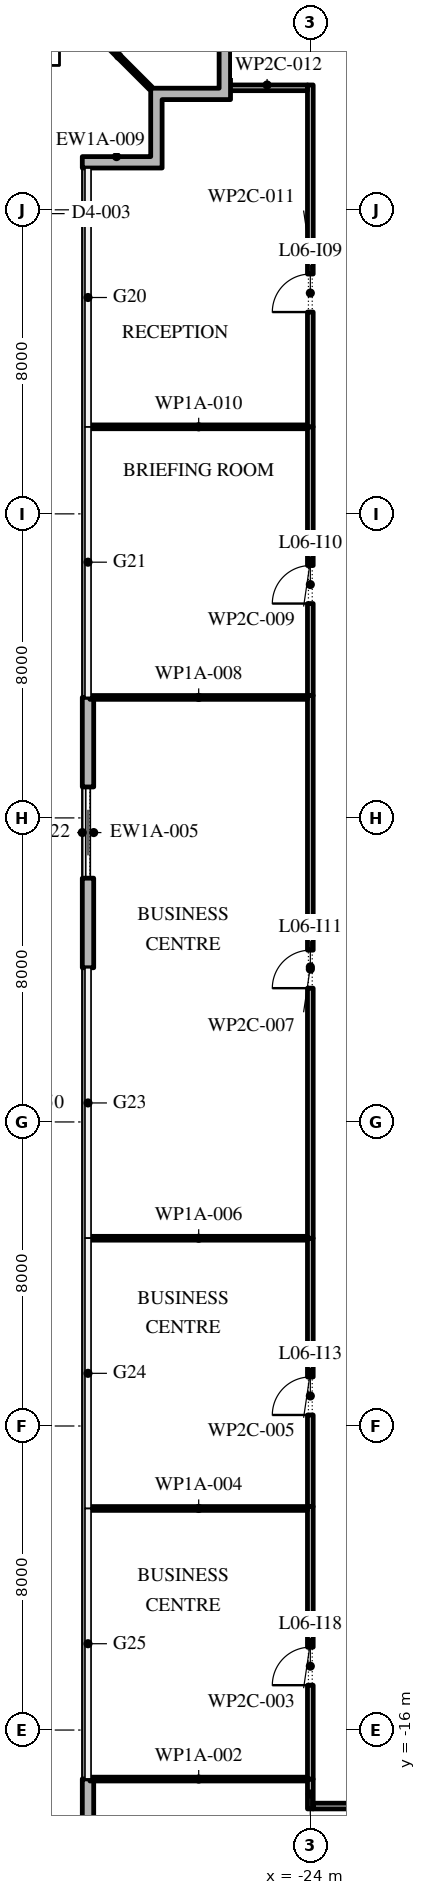
"""IFC4 building model, lengths in metres.
Left out: names, types, materials, properties, quantities, classifications, styles, units other than length and angle.
Written with IfcOpenShell. Run it as: python <this file> out.ifc"""

import sys

from ifc_helpers import new_model, si_unit, direction, frame, frame_2d, origin, place, context, subcontext, project, spatial, polyline, rectangle, outline, extrude, element, fill, save


model = new_model("IFC4")
c1 = context("Model", 3, precision=1e-05, world=origin(), true_north=direction((0.0, 1.0)))
c2 = subcontext(c1, "Body", "Model", "MODEL_VIEW")
j1 = project(units=[si_unit("LENGTHUNIT", "METRE"), si_unit("PLANEANGLEUNIT", "RADIAN")], contexts=[c1])
p1 = place(None, origin())
s1 = spatial("IfcSite", under=j1, at=p1, CompositionType="ELEMENT")
p2 = place(p1, origin())
s2 = spatial("IfcBuilding", under=s1, at=p2, CompositionType="ELEMENT")
p3 = place(p2, frame((0.0, 0.0, 33.6)))
s3 = spatial("IfcBuildingStorey", under=s2, at=p3, CompositionType="ELEMENT", Elevation=33.6)
p4 = place(p3, frame((-29.85, 11.171, 0.0), z_axis=(0.0, 0.0, 1.0), x_axis=(0.0, -1.0, 0.0)))
e1 = element("IfcWall", 1, at=p4, inside=s3, PredefinedType="STANDARD", context=c2, shape_type="SweptSolid", body=[
    extrude(rectangle(XDim=7.114, YDim=0.3, at=frame_2d((3.557, 0.0))), origin(), (0.0, 0.0, 1.0), 5.8),
])
p5 = place(p4, frame((2.357, 0.0, 0.0)))
e2 = element("IfcOpeningElement", 2, at=p5, cuts=e1, PredefinedType="OPENING", context=c2, shape_type="SweptSolid", body=[
    extrude(rectangle(XDim=2.4, YDim=3.5, at=frame_2d((1.2, 1.75))), frame((0.0, 0.16, 0.0), z_axis=(0.0, -1.0, 0.0), x_axis=(1.0, 0.0, 0.0)), (0.0, 0.0, 1.0), 0.32),
])
p6 = place(p3, frame((-29.85, -17.286, 0.0), z_axis=(0.0, 0.0, 1.0), x_axis=(0.0, -1.0, 0.0)))
e3 = element("IfcWall", 3, at=p6, inside=s3, PredefinedType="STANDARD", context=c2, shape_type="SweptSolid", body=[
    extrude(rectangle(XDim=7.114, YDim=0.3, at=frame_2d((3.557, 0.0))), origin(), (0.0, 0.0, 1.0), 5.8),
])
p7 = place(p6, frame((2.357, 0.0, 0.0)))
e4 = element("IfcOpeningElement", 4, at=p7, cuts=e3, PredefinedType="OPENING", context=c2, shape_type="SweptSolid", body=[
    extrude(rectangle(XDim=2.4, YDim=3.5, at=frame_2d((1.2, 1.75))), frame((0.0, 0.16, 0.0), z_axis=(0.0, -1.0, 0.0), x_axis=(1.0, 0.0, 0.0)), (0.0, 0.0, 1.0), 0.32),
])
p8 = place(p3, origin())
e5 = element("IfcWall", 5, at=p8, inside=s3, PredefinedType="STANDARD", context=c2, shape_type="SweptSolid", body=[
    extrude(outline(polyline([(-28.2, 25.4), (-28.2, 27.2), (-26.4, 27.2), (-26.4, 28.7), (-26.1, 28.7), (-26.1, 26.9), (-27.9, 26.9), (-27.9, 25.1), (-30.0, 25.1), (-30.0, 25.4), (-28.2, 25.4)])), origin(), (0.0, 0.0, 1.0), 5.8),
])
p9 = place(p3, frame((-28.2, 27.2, 0.0), z_axis=(0.0, 0.0, 1.0), x_axis=(-0.707106781187, 0.707106781187, 0.0)))
e6 = element("IfcWall", 6, at=p9, inside=s3, PredefinedType="STANDARD", context=c2, shape_type="SweptSolid", body=[
    extrude(rectangle(XDim=2.385, YDim=0.1, at=frame_2d((1.192, 0.0))), origin(), (0.0, 0.0, 1.0), 5.8),
])
p10 = place(p3, frame((-24.0, -18.075, 0.0), z_axis=(0.0, 0.0, 1.0), x_axis=(0.0, 1.0, 0.0)))
e7 = element("IfcWall", 7, at=p10, inside=s3, PredefinedType="PARTITIONING", context=c2, shape_type="SweptSolid", body=[
    extrude(rectangle(XDim=0.785, YDim=0.15, at=frame_2d((0.393, 0.0))), origin(), (0.0, 0.0, 1.0), 5.8),
])
p11 = place(p3, frame((-24.075, -17.29, 0.0), z_axis=(0.0, 0.0, 1.0), x_axis=(-1.0, 0.0, 0.0)))
e8 = element("IfcWall", 8, at=p11, inside=s3, PredefinedType="PARTITIONING", context=c2, shape_type="SweptSolid", body=[
    extrude(rectangle(XDim=5.725, YDim=0.1, at=frame_2d((2.863, 0.0))), origin(), (0.0, 0.0, 1.0), 5.8),
])
p12 = place(p3, frame((-24.0, -17.29, 0.0), z_axis=(0.0, 0.0, 1.0), x_axis=(0.0, 1.0, 0.0)))
e9 = element("IfcWall", 9, at=p12, inside=s3, PredefinedType="PARTITIONING", context=c2, shape_type="SweptSolid", body=[
    extrude(rectangle(XDim=7.17, YDim=0.15, at=frame_2d((3.585, 0.0))), origin(), (0.0, 0.0, 1.0), 5.8),
])
p13 = place(p12, frame((2.47, 0.0, 0.0)))
e10 = element("IfcOpeningElement", 10, at=p13, cuts=e9, PredefinedType="OPENING", context=c2, shape_type="SweptSolid", body=[
    extrude(rectangle(XDim=1.0, YDim=2.1, at=frame_2d((0.5, 1.05))), frame((0.0, 0.085, 0.0), z_axis=(0.0, -1.0, 0.0), x_axis=(1.0, 0.0, 0.0)), (0.0, 0.0, 1.0), 0.17),
])
p14 = place(p3, frame((-24.075, -10.17, 0.0), z_axis=(0.0, 0.0, 1.0), x_axis=(-1.0, 0.0, 0.0)))
e11 = element("IfcWall", 11, at=p14, inside=s3, PredefinedType="PARTITIONING", context=c2, shape_type="SweptSolid", body=[
    extrude(rectangle(XDim=5.725, YDim=0.1, at=frame_2d((2.863, 0.0))), origin(), (0.0, 0.0, 1.0), 5.8),
])
p15 = place(p3, frame((-24.0, -10.12, 0.0), z_axis=(0.0, 0.0, 1.0), x_axis=(0.0, 1.0, 0.0)))
e12 = element("IfcWall", 12, at=p15, inside=s3, PredefinedType="PARTITIONING", context=c2, shape_type="SweptSolid", body=[
    extrude(rectangle(XDim=7.06, YDim=0.15, at=frame_2d((3.53, 0.0))), origin(), (0.0, 0.0, 1.0), 5.8),
])
p16 = place(p15, frame((2.41, 0.0, 0.0)))
e13 = element("IfcOpeningElement", 13, at=p16, cuts=e12, PredefinedType="OPENING", context=c2, shape_type="SweptSolid", body=[
    extrude(rectangle(XDim=1.0, YDim=2.1, at=frame_2d((0.5, 1.05))), frame((0.0, 0.085, 0.0), z_axis=(0.0, -1.0, 0.0), x_axis=(1.0, 0.0, 0.0)), (0.0, 0.0, 1.0), 0.17),
])
p17 = place(p3, frame((-24.075, -3.06, 0.0), z_axis=(0.0, 0.0, 1.0), x_axis=(-1.0, 0.0, 0.0)))
e14 = element("IfcWall", 14, at=p17, inside=s3, PredefinedType="PARTITIONING", context=c2, shape_type="SweptSolid", body=[
    extrude(rectangle(XDim=5.725, YDim=0.1, at=frame_2d((2.863, 0.0))), origin(), (0.0, 0.0, 1.0), 5.8),
])
p18 = place(p3, frame((-24.0, -3.06, 0.0), z_axis=(0.0, 0.0, 1.0), x_axis=(0.0, 1.0, 0.0)))
e15 = element("IfcWall", 15, at=p18, inside=s3, PredefinedType="PARTITIONING", context=c2, shape_type="SweptSolid", body=[
    extrude(rectangle(XDim=14.28, YDim=0.15, at=frame_2d((7.14, 0.0))), origin(), (0.0, 0.0, 1.0), 5.8),
])
p19 = place(p18, frame((6.58, 0.0, 0.0)))
e16 = element("IfcOpeningElement", 16, at=p19, cuts=e15, PredefinedType="OPENING", context=c2, shape_type="SweptSolid", body=[
    extrude(rectangle(XDim=1.0, YDim=2.1, at=frame_2d((0.5, 1.05))), frame((0.0, 0.085, 0.0), z_axis=(0.0, -1.0, 0.0), x_axis=(1.0, 0.0, 0.0)), (0.0, 0.0, 1.0), 0.17),
])
p20 = place(p3, frame((-24.075, 11.17, 0.0), z_axis=(0.0, 0.0, 1.0), x_axis=(-1.0, 0.0, 0.0)))
e17 = element("IfcWall", 17, at=p20, inside=s3, PredefinedType="PARTITIONING", context=c2, shape_type="SweptSolid", body=[
    extrude(rectangle(XDim=5.725, YDim=0.1, at=frame_2d((2.863, 0.0))), origin(), (0.0, 0.0, 1.0), 5.8),
])
p21 = place(p3, frame((-24.0, 11.22, 0.0), z_axis=(0.0, 0.0, 1.0), x_axis=(0.0, 1.0, 0.0)))
e18 = element("IfcWall", 18, at=p21, inside=s3, PredefinedType="PARTITIONING", context=c2, shape_type="SweptSolid", body=[
    extrude(rectangle(XDim=7.07, YDim=0.15, at=frame_2d((3.535, 0.0))), origin(), (0.0, 0.0, 1.0), 5.8),
])
p22 = place(p21, frame((2.42, 0.0, 0.0)))
e19 = element("IfcOpeningElement", 19, at=p22, cuts=e18, PredefinedType="OPENING", context=c2, shape_type="SweptSolid", body=[
    extrude(rectangle(XDim=1.0, YDim=2.1, at=frame_2d((0.5, 1.05))), frame((0.0, 0.085, 0.0), z_axis=(0.0, -1.0, 0.0), x_axis=(1.0, 0.0, 0.0)), (0.0, 0.0, 1.0), 0.17),
])
p23 = place(p3, frame((-24.075, 18.29, 0.0), z_axis=(0.0, 0.0, 1.0), x_axis=(-1.0, 0.0, 0.0)))
e20 = element("IfcWall", 20, at=p23, inside=s3, PredefinedType="PARTITIONING", context=c2, shape_type="SweptSolid", body=[
    extrude(rectangle(XDim=5.725, YDim=0.1, at=frame_2d((2.863, 0.0))), origin(), (0.0, 0.0, 1.0), 5.8),
])
p24 = place(p3, frame((-24.0, 18.29, 0.0), z_axis=(0.0, 0.0, 1.0), x_axis=(0.0, 1.0, 0.0)))
e21 = element("IfcWall", 21, at=p24, inside=s3, PredefinedType="PARTITIONING", context=c2, shape_type="SweptSolid", body=[
    extrude(rectangle(XDim=8.995, YDim=0.15, at=frame_2d((4.498, 0.0))), origin(), (0.0, 0.0, 1.0), 5.8),
])
p25 = place(p24, frame((3.02, 0.0, 0.0)))
e22 = element("IfcOpeningElement", 22, at=p25, cuts=e21, PredefinedType="OPENING", context=c2, shape_type="SweptSolid", body=[
    extrude(rectangle(XDim=1.0, YDim=2.1, at=frame_2d((0.5, 1.05))), frame((0.0, 0.085, 0.0), z_axis=(0.0, -1.0, 0.0), x_axis=(1.0, 0.0, 0.0)), (0.0, 0.0, 1.0), 0.17),
])
p26 = place(p3, frame((-24.075, 27.21, 0.0), z_axis=(0.0, 0.0, 1.0), x_axis=(-1.0, 0.0, 0.0)))
e23 = element("IfcWall", 23, at=p26, inside=s3, PredefinedType="PARTITIONING", context=c2, shape_type="SweptSolid", body=[
    extrude(rectangle(XDim=2.125, YDim=0.15, at=frame_2d((1.062, 0.0))), origin(), (0.0, 0.0, 1.0), 5.8),
])
p27 = place(p3, frame((-17.65, -18.0, 0.0), z_axis=(0.0, 0.0, 1.0), x_axis=(-1.0, 0.0, 0.0)))
e24 = element("IfcWall", 24, at=p27, inside=s3, PredefinedType="PARTITIONING", context=c2, shape_type="SweptSolid", body=[
    extrude(rectangle(XDim=6.275, YDim=0.15, at=frame_2d((3.138, 0.0))), origin(), (0.0, 0.0, 1.0), 5.8),
])
p28 = place(p27, frame((2.7, 0.0, 0.0)))
e25 = element("IfcOpeningElement", 25, at=p28, cuts=e24, PredefinedType="OPENING", context=c2, shape_type="SweptSolid", body=[
    extrude(rectangle(XDim=1.0, YDim=2.1, at=frame_2d((0.5, 1.05))), frame((0.0, 0.085, 0.0), z_axis=(0.0, -1.0, 0.0), x_axis=(1.0, 0.0, 0.0)), (0.0, 0.0, 1.0), 0.17),
])
p29 = place(p5, origin())
e26 = element("IfcDoor", 26, at=p29, inside=s3, OperationType="DOUBLE_DOOR_SLIDING", PredefinedType="DOOR", context=c2, shape_type="SweptSolid", body=[
    extrude(rectangle(XDim=2.4, YDim=3.5, at=frame_2d((1.2, 1.75))), frame((0.0, 0.025, 0.0), z_axis=(0.0, -1.0, 0.0), x_axis=(1.0, 0.0, 0.0)), (0.0, 0.0, 1.0), 0.05),
])
fill(e2, e26)
p30 = place(p25, origin())
e27 = element("IfcDoor", 27, at=p30, inside=s3, OperationType="SINGLE_SWING_RIGHT", PredefinedType="DOOR", context=c2, shape_type="SweptSolid", body=[
    extrude(rectangle(XDim=1.0, YDim=2.1, at=frame_2d((0.5, 1.05))), frame((0.0, 0.025, 0.0), z_axis=(0.0, -1.0, 0.0), x_axis=(1.0, 0.0, 0.0)), (0.0, 0.0, 1.0), 0.05),
])
fill(e22, e27)
p31 = place(p22, origin())
e28 = element("IfcDoor", 28, at=p31, inside=s3, OperationType="SINGLE_SWING_RIGHT", PredefinedType="DOOR", context=c2, shape_type="SweptSolid", body=[
    extrude(rectangle(XDim=1.0, YDim=2.1, at=frame_2d((0.5, 1.05))), frame((0.0, 0.025, 0.0), z_axis=(0.0, -1.0, 0.0), x_axis=(1.0, 0.0, 0.0)), (0.0, 0.0, 1.0), 0.05),
])
fill(e19, e28)
p32 = place(p19, origin())
e29 = element("IfcDoor", 29, at=p32, inside=s3, OperationType="SINGLE_SWING_RIGHT", PredefinedType="DOOR", context=c2, shape_type="SweptSolid", body=[
    extrude(rectangle(XDim=1.0, YDim=2.1, at=frame_2d((0.5, 1.05))), frame((0.0, 0.025, 0.0), z_axis=(0.0, -1.0, 0.0), x_axis=(1.0, 0.0, 0.0)), (0.0, 0.0, 1.0), 0.05),
])
fill(e16, e29)
p33 = place(p16, origin())
e30 = element("IfcDoor", 30, at=p33, inside=s3, OperationType="SINGLE_SWING_RIGHT", PredefinedType="DOOR", context=c2, shape_type="SweptSolid", body=[
    extrude(rectangle(XDim=1.0, YDim=2.1, at=frame_2d((0.5, 1.05))), frame((0.0, 0.025, 0.0), z_axis=(0.0, -1.0, 0.0), x_axis=(1.0, 0.0, 0.0)), (0.0, 0.0, 1.0), 0.05),
])
fill(e13, e30)
p34 = place(p13, origin())
e31 = element("IfcDoor", 31, at=p34, inside=s3, OperationType="SINGLE_SWING_RIGHT", PredefinedType="DOOR", context=c2, shape_type="SweptSolid", body=[
    extrude(rectangle(XDim=1.0, YDim=2.1, at=frame_2d((0.5, 1.05))), frame((0.0, 0.025, 0.0), z_axis=(0.0, -1.0, 0.0), x_axis=(1.0, 0.0, 0.0)), (0.0, 0.0, 1.0), 0.05),
])
fill(e10, e31)
save(model, sys.argv[1])
